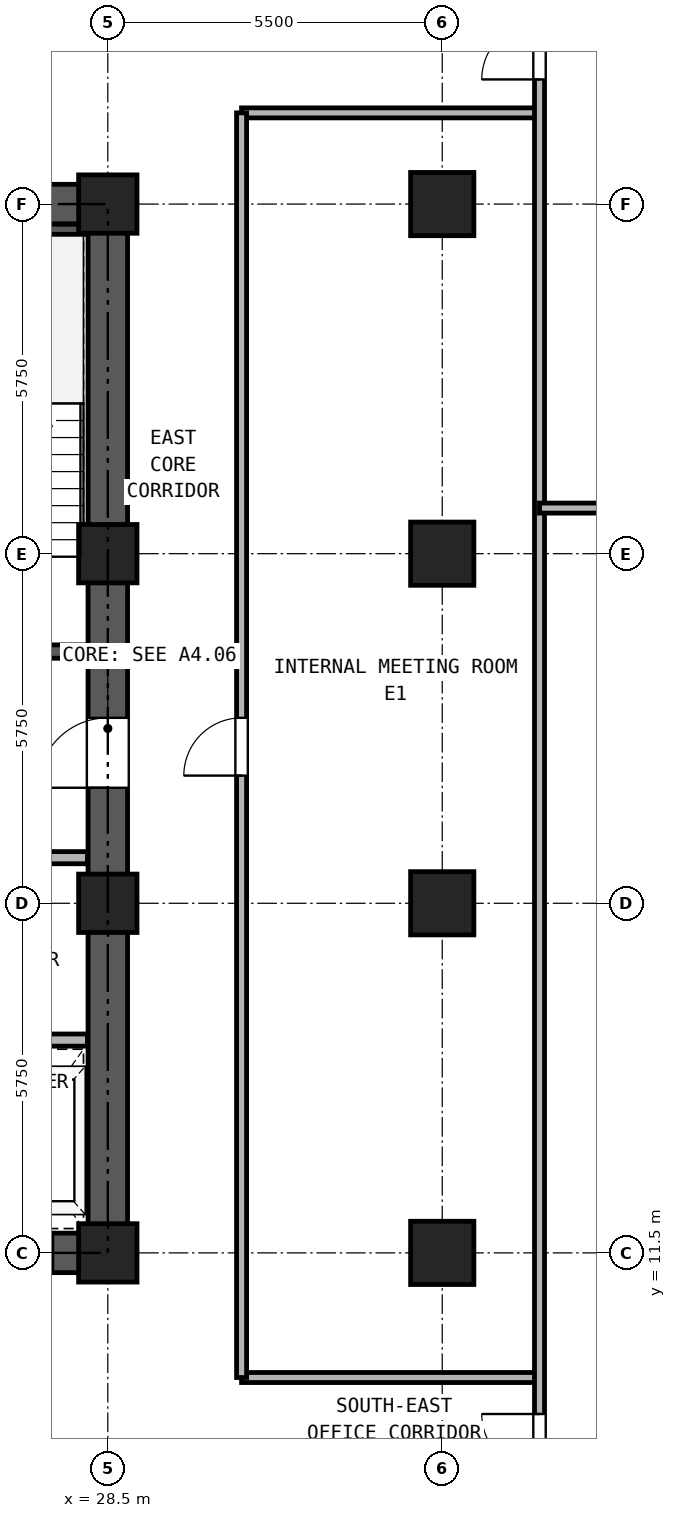
"""IFC4 building model, lengths in metres.
Left out: names, types, materials, properties, quantities, classifications, styles, units other than length and angle.
Written with IfcOpenShell. Run it as: python <this file> out.ifc"""

import sys

from ifc_helpers import new_model, si_unit, direction, frame, frame_2d, origin, origin_2d, place, context, subcontext, project, spatial, rectangle, hollow_rectangle, extrude, source, transform, mapped, element, fill, save


model = new_model("IFC4")
c1 = context("Model", 3, precision=1e-05, world=origin(), true_north=direction((0.0, 1.0)))
c2 = subcontext(c1, "Body", "Model", "MODEL_VIEW")
j1 = project(units=[si_unit("LENGTHUNIT", "METRE"), si_unit("PLANEANGLEUNIT", "RADIAN")], contexts=[c1])
p1 = place(None, origin())
s1 = spatial("IfcSite", under=j1, at=p1, CompositionType="ELEMENT")
p2 = place(p1, origin())
s2 = spatial("IfcBuilding", under=s1, at=p2, CompositionType="ELEMENT")
p3 = place(p2, frame((0.0, 0.0, 33.3)))
s3 = spatial("IfcBuildingStorey", under=s2, at=p3, CompositionType="ELEMENT", Elevation=33.3)
m1 = source(origin(), c2, "Body", "SweptSolid", [
    extrude(hollow_rectangle(XDim=0.96, YDim=0.96, WallThickness=0.06, at=origin_2d()), origin(), (0.0, 0.0, 1.0), 3.32),
])
for number, where, z_axis, x_axis in (
    (1, (28.5, 11.5, 0.0), (0.0, 0.0, 1.0), (1.0, 0.0, 0.0)),
    (2, (28.5, 17.25, 0.0), (0.0, 0.0, 1.0), (1.0, 0.0, 0.0)),
    (3, (28.5, 23.0, 0.0), (0.0, 0.0, 1.0), (1.0, 0.0, 0.0)),
    (4, (28.5, 28.75, 0.0), (0.0, 0.0, 1.0), (1.0, 0.0, 0.0)),
):
    element("IfcColumn", number, at=place(p3, frame(where, z_axis=z_axis, x_axis=x_axis)), inside=s3, PredefinedType="COLUMN", context=c2, shape_type="MappedRepresentation", body=[
        mapped(m1, transform((0.0, 0.0, 0.0), x_axis=(1.0, 0.0, 0.0), y_axis=(0.0, 1.0, 0.0), z_axis=(0.0, 0.0, 1.0), scale=1.0)),
    ])
m2 = source(origin(), c2, "Body", "SweptSolid", [
    extrude(hollow_rectangle(XDim=1.04, YDim=1.04, WallThickness=0.065, at=origin_2d()), origin(), (0.0, 0.0, 1.0), 3.32),
])
for number, where, z_axis, x_axis in (
    (5, (34.0, 11.5, 0.0), (0.0, 0.0, 1.0), (1.0, 0.0, 0.0)),
    (6, (34.0, 17.25, 0.0), (0.0, 0.0, 1.0), (1.0, 0.0, 0.0)),
    (7, (34.0, 23.0, 0.0), (0.0, 0.0, 1.0), (1.0, 0.0, 0.0)),
    (8, (34.0, 28.75, 0.0), (0.0, 0.0, 1.0), (1.0, 0.0, 0.0)),
):
    element("IfcColumn", number, at=place(p3, frame(where, z_axis=z_axis, x_axis=x_axis)), inside=s3, PredefinedType="COLUMN", context=c2, shape_type="MappedRepresentation", body=[
        mapped(m2, transform((0.0, 0.0, 0.0), x_axis=(1.0, 0.0, 0.0), y_axis=(0.0, 1.0, 0.0), z_axis=(0.0, 0.0, 1.0), scale=1.0)),
    ])
p4 = place(p3, frame((18.175, 11.5, 0.0), z_axis=(0.0, 0.0, 1.0), x_axis=(1.0, 0.0, 0.0)))
e9 = element("IfcWall", 9, at=p4, inside=s3, PredefinedType="SHEAR", context=c2, shape_type="SweptSolid", body=[
    extrude(rectangle(XDim=10.65, YDim=0.65, at=frame_2d((5.325, 0.0))), origin(), (0.0, 0.0, 1.0), 3.32),
])
p5 = place(p4, frame((1.195, 0.0, 0.0)))
e10 = element("IfcOpeningElement", 10, at=p5, cuts=e9, PredefinedType="OPENING", context=c2, shape_type="SweptSolid", body=[
    extrude(rectangle(XDim=1.1, YDim=2.25, at=frame_2d((0.55, 1.125))), frame((0.0, 0.335, 0.0), z_axis=(0.0, -1.0, 0.0), x_axis=(1.0, 0.0, 0.0)), (0.0, 0.0, 1.0), 0.67),
])
p6 = place(p4, frame((3.495, 0.0, 0.0)))
e11 = element("IfcOpeningElement", 11, at=p6, cuts=e9, PredefinedType="OPENING", context=c2, shape_type="SweptSolid", body=[
    extrude(rectangle(XDim=1.1, YDim=2.25, at=frame_2d((0.55, 1.125))), frame((0.0, 0.335, 0.0), z_axis=(0.0, -1.0, 0.0), x_axis=(1.0, 0.0, 0.0)), (0.0, 0.0, 1.0), 0.67),
])
p7 = place(p4, frame((5.925, 0.0, 0.0)))
e12 = element("IfcOpeningElement", 12, at=p7, cuts=e9, PredefinedType="OPENING", context=c2, shape_type="SweptSolid", body=[
    extrude(rectangle(XDim=1.1, YDim=2.25, at=frame_2d((0.55, 1.125))), frame((0.0, 0.335, 0.0), z_axis=(0.0, -1.0, 0.0), x_axis=(1.0, 0.0, 0.0)), (0.0, 0.0, 1.0), 0.67),
])
p8 = place(p4, frame((8.325, 0.0, 0.0)))
e13 = element("IfcOpeningElement", 13, at=p8, cuts=e9, PredefinedType="OPENING", context=c2, shape_type="SweptSolid", body=[
    extrude(rectangle(XDim=1.1, YDim=2.25, at=frame_2d((0.55, 1.125))), frame((0.0, 0.335, 0.0), z_axis=(0.0, -1.0, 0.0), x_axis=(1.0, 0.0, 0.0)), (0.0, 0.0, 1.0), 0.67),
])
p9 = place(p3, frame((18.175, 28.75, 0.0), z_axis=(0.0, 0.0, 1.0), x_axis=(1.0, 0.0, 0.0)))
e14 = element("IfcWall", 14, at=p9, inside=s3, PredefinedType="SHEAR", context=c2, shape_type="SweptSolid", body=[
    extrude(rectangle(XDim=10.65, YDim=0.65, at=frame_2d((5.325, 0.0))), origin(), (0.0, 0.0, 1.0), 3.32),
])
p10 = place(p9, frame((4.205, 0.0, 0.0)))
e15 = element("IfcOpeningElement", 15, at=p10, cuts=e14, PredefinedType="OPENING", context=c2, shape_type="SweptSolid", body=[
    extrude(rectangle(XDim=0.9, YDim=2.05, at=frame_2d((0.45, 1.025))), frame((0.0, 0.335, 0.0), z_axis=(0.0, -1.0, 0.0), x_axis=(1.0, 0.0, 0.0)), (0.0, 0.0, 1.0), 0.67),
])
p11 = place(p9, frame((5.745, 0.0, 0.0)))
e16 = element("IfcOpeningElement", 16, at=p11, cuts=e14, PredefinedType="OPENING", context=c2, shape_type="SweptSolid", body=[
    extrude(rectangle(XDim=0.9, YDim=2.05, at=frame_2d((0.45, 1.025))), frame((0.0, 0.335, 0.0), z_axis=(0.0, -1.0, 0.0), x_axis=(1.0, 0.0, 0.0)), (0.0, 0.0, 1.0), 0.67),
])
p12 = place(p3, frame((28.5, 11.825, 0.0), z_axis=(0.0, 0.0, 1.0), x_axis=(0.0, 1.0, 0.0)))
e17 = element("IfcWall", 17, at=p12, inside=s3, PredefinedType="SHEAR", context=c2, shape_type="SweptSolid", body=[
    extrude(rectangle(XDim=16.6, YDim=0.65, at=frame_2d((8.3, 0.0))), origin(), (0.0, 0.0, 1.0), 3.32),
])
p13 = place(p12, frame((7.325, 0.0, 0.0)))
e18 = element("IfcOpeningElement", 18, at=p13, cuts=e17, PredefinedType="OPENING", context=c2, shape_type="SweptSolid", body=[
    extrude(rectangle(XDim=1.15, YDim=2.2, at=frame_2d((0.575, 1.1))), frame((0.0, 0.335, 0.0), z_axis=(0.0, -1.0, 0.0), x_axis=(1.0, 0.0, 0.0)), (0.0, 0.0, 1.0), 0.67),
])
p14 = place(p3, frame((25.13, 28.335, 0.0), z_axis=(0.0, 0.0, 1.0), x_axis=(1.0, 0.0, 0.0)))
e19 = element("IfcWall", 19, at=p14, inside=s3, PredefinedType="PARTITIONING", context=c2, shape_type="SweptSolid", body=[
    extrude(rectangle(XDim=3.035, YDim=0.165, at=frame_2d((1.518, 0.0))), origin(), (0.0, 0.0, 1.0), 3.32),
])
p15 = place(p3, frame((25.13, 21.39, 0.0), z_axis=(0.0, 0.0, 1.0), x_axis=(1.0, 0.0, 0.0)))
e20 = element("IfcWall", 20, at=p15, inside=s3, PredefinedType="SOLIDWALL", context=c2, shape_type="SweptSolid", body=[
    extrude(rectangle(XDim=3.035, YDim=0.22, at=frame_2d((1.518, 0.0))), origin(), (0.0, 0.0, 1.0), 3.32),
])
p16 = place(p15, frame((0.92, 0.0, 0.0)))
e21 = element("IfcOpeningElement", 21, at=p16, cuts=e20, PredefinedType="OPENING", context=c2, shape_type="SweptSolid", body=[
    extrude(rectangle(XDim=1.15, YDim=2.2, at=frame_2d((0.575, 1.1))), frame((0.0, 0.12, 0.0), z_axis=(0.0, -1.0, 0.0), x_axis=(1.0, 0.0, 0.0)), (0.0, 0.0, 1.0), 0.24),
])
p17 = place(p3, frame((18.835, 18.0, 0.0), z_axis=(0.0, 0.0, 1.0), x_axis=(1.0, 0.0, 0.0)))
e22 = element("IfcWall", 22, at=p17, inside=s3, PredefinedType="PARTITIONING", context=c2, shape_type="SweptSolid", body=[
    extrude(rectangle(XDim=9.33, YDim=0.2, at=frame_2d((4.665, 0.0))), origin(), (0.0, 0.0, 1.0), 3.32),
])
p18 = place(p17, frame((0.415, 0.0, 0.0)))
e23 = element("IfcOpeningElement", 23, at=p18, cuts=e22, PredefinedType="OPENING", context=c2, shape_type="SweptSolid", body=[
    extrude(rectangle(XDim=1.3, YDim=2.3, at=frame_2d((0.65, 1.15))), frame((0.0, 0.11, 0.0), z_axis=(0.0, -1.0, 0.0), x_axis=(1.0, 0.0, 0.0)), (0.0, 0.0, 1.0), 0.22),
])
p19 = place(p17, frame((2.515, 0.0, 0.0)))
e24 = element("IfcOpeningElement", 24, at=p19, cuts=e22, PredefinedType="OPENING", context=c2, shape_type="SweptSolid", body=[
    extrude(rectangle(XDim=1.3, YDim=2.3, at=frame_2d((0.65, 1.15))), frame((0.0, 0.11, 0.0), z_axis=(0.0, -1.0, 0.0), x_axis=(1.0, 0.0, 0.0)), (0.0, 0.0, 1.0), 0.22),
])
p20 = place(p17, frame((4.915, 0.0, 0.0)))
e25 = element("IfcOpeningElement", 25, at=p20, cuts=e22, PredefinedType="OPENING", context=c2, shape_type="SweptSolid", body=[
    extrude(rectangle(XDim=0.9, YDim=2.05, at=frame_2d((0.45, 1.025))), frame((0.0, 0.11, 0.0), z_axis=(0.0, -1.0, 0.0), x_axis=(1.0, 0.0, 0.0)), (0.0, 0.0, 1.0), 0.22),
])
p21 = place(p17, frame((7.615, 0.0, 0.0)))
e26 = element("IfcOpeningElement", 26, at=p21, cuts=e22, PredefinedType="OPENING", context=c2, shape_type="SweptSolid", body=[
    extrude(rectangle(XDim=0.9, YDim=2.05, at=frame_2d((0.45, 1.025))), frame((0.0, 0.11, 0.0), z_axis=(0.0, -1.0, 0.0), x_axis=(1.0, 0.0, 0.0)), (0.0, 0.0, 1.0), 0.22),
])
p22 = place(p3, frame((18.835, 15.0, 0.0), z_axis=(0.0, 0.0, 1.0), x_axis=(1.0, 0.0, 0.0)))
e27 = element("IfcWall", 27, at=p22, inside=s3, PredefinedType="PARTITIONING", context=c2, shape_type="SweptSolid", body=[
    extrude(rectangle(XDim=9.33, YDim=0.2, at=frame_2d((4.665, 0.0))), origin(), (0.0, 0.0, 1.0), 3.32),
])
for number, where, z_axis, x_axis in (
    (28, (30.7, 9.45, 0.0), (0.0, 0.0, 1.0), (1.0, 0.0, 0.0)),
    (29, (30.7, 30.25, 0.0), (0.0, 0.0, 1.0), (1.0, 0.0, 0.0)),
):
    element("IfcWall", number, at=place(p3, frame(where, z_axis=z_axis, x_axis=x_axis)), inside=s3, PredefinedType="PARTITIONING", context=c2, shape_type="SweptSolid", body=[
        extrude(rectangle(XDim=4.9, YDim=0.165, at=frame_2d((2.45, 0.0))), origin(), (0.0, 0.0, 1.0), 3.32),
    ])
p23 = place(p3, frame((30.7, 9.45, 0.0), z_axis=(0.0, 0.0, 1.0), x_axis=(0.0, 1.0, 0.0)))
e30 = element("IfcWall", 30, at=p23, inside=s3, PredefinedType="PARTITIONING", context=c2, shape_type="SweptSolid", body=[
    extrude(rectangle(XDim=20.8, YDim=0.165, at=frame_2d((10.4, 0.0))), origin(), (0.0, 0.0, 1.0), 3.32),
])
p24 = place(p23, frame((9.9, 0.0, 0.0)))
e31 = element("IfcOpeningElement", 31, at=p24, cuts=e30, PredefinedType="OPENING", context=c2, shape_type="SweptSolid", body=[
    extrude(rectangle(XDim=0.95, YDim=2.15, at=frame_2d((0.475, 1.075))), frame((0.0, 0.093, 0.0), z_axis=(0.0, -1.0, 0.0), x_axis=(1.0, 0.0, 0.0)), (0.0, 0.0, 1.0), 0.185),
])
p25 = place(p3, frame((35.6, 0.16, 0.0), z_axis=(0.0, 0.0, 1.0), x_axis=(0.0, 1.0, 0.0)))
e32 = element("IfcWall", 32, at=p25, inside=s3, PredefinedType="PARTITIONING", context=c2, shape_type="SweptSolid", body=[
    extrude(rectangle(XDim=40.18, YDim=0.165, at=frame_2d((20.09, 0.0))), origin(), (0.0, 0.0, 1.0), 3.32),
])
p26 = place(p25, frame((7.74, 0.0, 0.0)))
e33 = element("IfcOpeningElement", 33, at=p26, cuts=e32, PredefinedType="OPENING", context=c2, shape_type="SweptSolid", body=[
    extrude(rectangle(XDim=0.95, YDim=2.15, at=frame_2d((0.475, 1.075))), frame((0.0, 0.093, 0.0), z_axis=(0.0, -1.0, 0.0), x_axis=(1.0, 0.0, 0.0)), (0.0, 0.0, 1.0), 0.185),
])
p27 = place(p25, frame((30.64, 0.0, 0.0)))
e34 = element("IfcOpeningElement", 34, at=p27, cuts=e32, PredefinedType="OPENING", context=c2, shape_type="SweptSolid", body=[
    extrude(rectangle(XDim=0.95, YDim=2.15, at=frame_2d((0.475, 1.075))), frame((0.0, 0.093, 0.0), z_axis=(0.0, -1.0, 0.0), x_axis=(1.0, 0.0, 0.0)), (0.0, 0.0, 1.0), 0.185),
])
p28 = place(p3, frame((35.6, 23.75, 0.0), z_axis=(0.0, 0.0, 1.0), x_axis=(1.0, 0.0, 0.0)))
e35 = element("IfcWall", 35, at=p28, inside=s3, PredefinedType="PARTITIONING", context=c2, shape_type="SweptSolid", body=[
    extrude(rectangle(XDim=11.24, YDim=0.165, at=frame_2d((5.62, 0.0))), origin(), (0.0, 0.0, 1.0), 3.32),
])
p29 = place(p13, origin())
e36 = element("IfcDoor", 36, at=p29, inside=s3, OperationType="SINGLE_SWING_LEFT", PredefinedType="DOOR", context=c2, shape_type="SweptSolid", body=[
    extrude(rectangle(XDim=1.15, YDim=2.2, at=frame_2d((0.575, 1.1))), frame((0.0, 0.025, 0.0), z_axis=(0.0, -1.0, 0.0), x_axis=(1.0, 0.0, 0.0)), (0.0, 0.0, 1.0), 0.05),
])
fill(e18, e36)
p30 = place(p8, frame((1.1, 0.0, 0.0), z_axis=(0.0, 0.0, 1.0), x_axis=(-1.0, 0.0, 0.0)))
e37 = element("IfcDoor", 37, at=p30, inside=s3, OperationType="DOUBLE_DOOR_SLIDING", PredefinedType="DOOR", context=c2, shape_type="SweptSolid", body=[
    extrude(rectangle(XDim=1.1, YDim=2.25, at=frame_2d((0.55, 1.125))), frame((0.0, 0.025, 0.0), z_axis=(0.0, -1.0, 0.0), x_axis=(1.0, 0.0, 0.0)), (0.0, 0.0, 1.0), 0.05),
])
fill(e13, e37)
p31 = place(p26, origin())
e38 = element("IfcDoor", 38, at=p31, inside=s3, OperationType="SINGLE_SWING_RIGHT", PredefinedType="DOOR", context=c2, shape_type="SweptSolid", body=[
    extrude(rectangle(XDim=0.95, YDim=2.15, at=frame_2d((0.475, 1.075))), frame((0.0, 0.025, 0.0), z_axis=(0.0, -1.0, 0.0), x_axis=(1.0, 0.0, 0.0)), (0.0, 0.0, 1.0), 0.05),
])
fill(e33, e38)
p32 = place(p27, origin())
e39 = element("IfcDoor", 39, at=p32, inside=s3, OperationType="SINGLE_SWING_LEFT", PredefinedType="DOOR", context=c2, shape_type="SweptSolid", body=[
    extrude(rectangle(XDim=0.95, YDim=2.15, at=frame_2d((0.475, 1.075))), frame((0.0, 0.025, 0.0), z_axis=(0.0, -1.0, 0.0), x_axis=(1.0, 0.0, 0.0)), (0.0, 0.0, 1.0), 0.05),
])
fill(e34, e39)
p33 = place(p24, origin())
e40 = element("IfcDoor", 40, at=p33, inside=s3, OperationType="SINGLE_SWING_LEFT", PredefinedType="DOOR", context=c2, shape_type="SweptSolid", body=[
    extrude(rectangle(XDim=0.95, YDim=2.15, at=frame_2d((0.475, 1.075))), frame((0.0, 0.025, 0.0), z_axis=(0.0, -1.0, 0.0), x_axis=(1.0, 0.0, 0.0)), (0.0, 0.0, 1.0), 0.05),
])
fill(e31, e40)
save(model, sys.argv[1])
